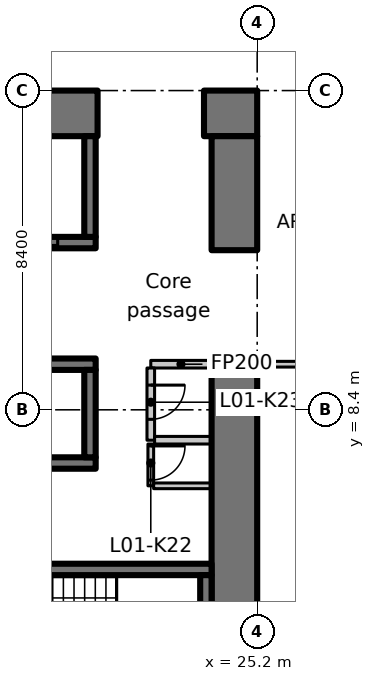
"""IFC4 building model, lengths in metres.
Left out: names, types, materials, properties, quantities, classifications, styles, units other than length and angle.
Written with IfcOpenShell. Run it as: python <this file> out.ifc"""

import sys

from ifc_helpers import new_model, si_unit, direction, frame, frame_2d, origin, place, context, subcontext, project, spatial, rectangle, extrude, element, fill, save


model = new_model("IFC4")
c1 = context("Model", 3, precision=1e-05, world=origin(), true_north=direction((0.0, 1.0)))
c2 = subcontext(c1, "Body", "Model", "MODEL_VIEW")
j1 = project(units=[si_unit("LENGTHUNIT", "METRE"), si_unit("PLANEANGLEUNIT", "RADIAN")], contexts=[c1])
p1 = place(None, origin())
s1 = spatial("IfcSite", under=j1, at=p1, CompositionType="ELEMENT")
p2 = place(p1, origin())
s2 = spatial("IfcBuilding", under=s1, at=p2, CompositionType="ELEMENT")
p3 = place(p2, frame((0.0, 0.0, 7.0)))
s3 = spatial("IfcBuildingStorey", under=s2, at=p3, CompositionType="ELEMENT", Elevation=7.0)
p4 = place(p3, frame((-1.1, 16.2, 0.0), z_axis=(0.0, 0.0, 1.0), x_axis=(1.0, 0.0, 0.0)))
e1 = element("IfcWall", 1, at=p4, inside=s3, PredefinedType="SHEAR", context=c2, shape_type="SweptSolid", body=[
    extrude(rectangle(XDim=22.1, YDim=1.2, at=frame_2d((11.05, 0.0))), origin(), (0.0, 0.0, 1.0), 5.25),
])
p5 = place(p4, frame((3.15, 0.0, 0.0)))
e2 = element("IfcOpeningElement", 2, at=p5, cuts=e1, PredefinedType="OPENING", context=c2, shape_type="SweptSolid", body=[
    extrude(rectangle(XDim=1.1, YDim=2.3, at=frame_2d((0.55, 1.15))), frame((0.0, 0.61, 0.0), z_axis=(0.0, -1.0, 0.0), x_axis=(1.0, 0.0, 0.0)), (0.0, 0.0, 1.0), 1.22),
])
p6 = place(p3, frame((23.8, 16.2, 0.0), z_axis=(0.0, 0.0, 1.0), x_axis=(1.0, 0.0, 0.0)))
e3 = element("IfcWall", 3, at=p6, inside=s3, PredefinedType="SHEAR", context=c2, shape_type="SweptSolid", body=[
    extrude(rectangle(XDim=1.4, YDim=1.2, at=frame_2d((0.7, 0.0))), origin(), (0.0, 0.0, 1.0), 5.25),
])
p7 = place(p3, frame((24.6, 1.2, 0.0), z_axis=(0.0, 0.0, 1.0), x_axis=(0.0, 1.0, 0.0)))
e4 = element("IfcWall", 4, at=p7, inside=s3, PredefinedType="SHEAR", context=c2, shape_type="SweptSolid", body=[
    extrude(rectangle(XDim=8.6, YDim=1.2, at=frame_2d((4.3, 0.0))), origin(), (0.0, 0.0, 1.0), 5.25),
])
p8 = place(p3, frame((24.6, 12.6, 0.0), z_axis=(0.0, 0.0, 1.0), x_axis=(0.0, 1.0, 0.0)))
e5 = element("IfcWall", 5, at=p8, inside=s3, PredefinedType="SHEAR", context=c2, shape_type="SweptSolid", body=[
    extrude(rectangle(XDim=3.0, YDim=1.2, at=frame_2d((1.5, 0.0))), origin(), (0.0, 0.0, 1.0), 5.25),
])
p9 = place(p3, frame((1.2, 7.0, 0.0), z_axis=(0.0, 0.0, 1.0), x_axis=(1.0, 0.0, 0.0)))
e6 = element("IfcWall", 6, at=p9, inside=s3, PredefinedType="SHEAR", context=c2, shape_type="SweptSolid", body=[
    extrude(rectangle(XDim=19.75, YDim=0.3, at=frame_2d((9.875, 0.0))), origin(), (0.0, 0.0, 1.0), 5.25),
])
p10 = place(p3, frame((1.2, 9.6, 0.0), z_axis=(0.0, 0.0, 1.0), x_axis=(1.0, 0.0, 0.0)))
e7 = element("IfcWall", 7, at=p10, inside=s3, PredefinedType="SHEAR", context=c2, shape_type="SweptSolid", body=[
    extrude(rectangle(XDim=19.75, YDim=0.3, at=frame_2d((9.875, 0.0))), origin(), (0.0, 0.0, 1.0), 5.25),
])
p11 = place(p10, frame((0.85, 0.0, 0.0)))
e8 = element("IfcOpeningElement", 8, at=p11, cuts=e7, PredefinedType="OPENING", context=c2, shape_type="SweptSolid", body=[
    extrude(rectangle(XDim=1.1, YDim=2.3, at=frame_2d((0.55, 1.15))), frame((0.0, 0.16, 0.0), z_axis=(0.0, -1.0, 0.0), x_axis=(1.0, 0.0, 0.0)), (0.0, 0.0, 1.0), 0.32),
])
p12 = place(p10, frame((3.65, 0.0, 0.0)))
e9 = element("IfcOpeningElement", 9, at=p12, cuts=e7, PredefinedType="OPENING", context=c2, shape_type="SweptSolid", body=[
    extrude(rectangle(XDim=1.1, YDim=2.3, at=frame_2d((0.55, 1.15))), frame((0.0, 0.16, 0.0), z_axis=(0.0, -1.0, 0.0), x_axis=(1.0, 0.0, 0.0)), (0.0, 0.0, 1.0), 0.32),
])
p13 = place(p10, frame((6.45, 0.0, 0.0)))
e10 = element("IfcOpeningElement", 10, at=p13, cuts=e7, PredefinedType="OPENING", context=c2, shape_type="SweptSolid", body=[
    extrude(rectangle(XDim=1.1, YDim=2.3, at=frame_2d((0.55, 1.15))), frame((0.0, 0.16, 0.0), z_axis=(0.0, -1.0, 0.0), x_axis=(1.0, 0.0, 0.0)), (0.0, 0.0, 1.0), 0.32),
])
p14 = place(p10, frame((9.25, 0.0, 0.0)))
e11 = element("IfcOpeningElement", 11, at=p14, cuts=e7, PredefinedType="OPENING", context=c2, shape_type="SweptSolid", body=[
    extrude(rectangle(XDim=1.1, YDim=2.3, at=frame_2d((0.55, 1.15))), frame((0.0, 0.16, 0.0), z_axis=(0.0, -1.0, 0.0), x_axis=(1.0, 0.0, 0.0)), (0.0, 0.0, 1.0), 0.32),
])
p15 = place(p10, frame((12.05, 0.0, 0.0)))
e12 = element("IfcOpeningElement", 12, at=p15, cuts=e7, PredefinedType="OPENING", context=c2, shape_type="SweptSolid", body=[
    extrude(rectangle(XDim=1.1, YDim=2.3, at=frame_2d((0.55, 1.15))), frame((0.0, 0.16, 0.0), z_axis=(0.0, -1.0, 0.0), x_axis=(1.0, 0.0, 0.0)), (0.0, 0.0, 1.0), 0.32),
])
p16 = place(p10, frame((14.85, 0.0, 0.0)))
e13 = element("IfcOpeningElement", 13, at=p16, cuts=e7, PredefinedType="OPENING", context=c2, shape_type="SweptSolid", body=[
    extrude(rectangle(XDim=1.1, YDim=2.3, at=frame_2d((0.55, 1.15))), frame((0.0, 0.16, 0.0), z_axis=(0.0, -1.0, 0.0), x_axis=(1.0, 0.0, 0.0)), (0.0, 0.0, 1.0), 0.32),
])
p17 = place(p3, frame((20.8, 7.15, 0.0), z_axis=(0.0, 0.0, 1.0), x_axis=(0.0, 1.0, 0.0)))
e14 = element("IfcWall", 14, at=p17, inside=s3, PredefinedType="SHEAR", context=c2, shape_type="SweptSolid", body=[
    extrude(rectangle(XDim=2.3, YDim=0.3, at=frame_2d((1.15, 0.0))), origin(), (0.0, 0.0, 1.0), 5.25),
])
p18 = place(p3, frame((15.05, 12.8, 0.0), z_axis=(0.0, 0.0, 1.0), x_axis=(1.0, 0.0, 0.0)))
e15 = element("IfcWall", 15, at=p18, inside=s3, PredefinedType="SHEAR", context=c2, shape_type="SweptSolid", body=[
    extrude(rectangle(XDim=5.9, YDim=0.3, at=frame_2d((2.95, 0.0))), origin(), (0.0, 0.0, 1.0), 5.25),
])
p19 = place(p18, frame((3.8, 0.0, 0.0)))
e16 = element("IfcOpeningElement", 16, at=p19, cuts=e15, PredefinedType="OPENING", context=c2, shape_type="SweptSolid", body=[
    extrude(rectangle(XDim=1.1, YDim=2.3, at=frame_2d((0.55, 1.15))), frame((0.0, 0.16, 0.0), z_axis=(0.0, -1.0, 0.0), x_axis=(1.0, 0.0, 0.0)), (0.0, 0.0, 1.0), 0.32),
])
p20 = place(p3, frame((20.8, 12.95, 0.0), z_axis=(0.0, 0.0, 1.0), x_axis=(0.0, 1.0, 0.0)))
e17 = element("IfcWall", 17, at=p20, inside=s3, PredefinedType="SHEAR", context=c2, shape_type="SweptSolid", body=[
    extrude(rectangle(XDim=2.65, YDim=0.3, at=frame_2d((1.325, 0.0))), origin(), (0.0, 0.0, 1.0), 5.25),
])
p21 = place(p3, frame((15.8, 4.2, 0.0), z_axis=(0.0, 0.0, 1.0), x_axis=(1.0, 0.0, 0.0)))
e18 = element("IfcWall", 18, at=p21, inside=s3, PredefinedType="SHEAR", context=c2, shape_type="SweptSolid", body=[
    extrude(rectangle(XDim=8.2, YDim=0.3, at=frame_2d((4.1, 0.0))), origin(), (0.0, 0.0, 1.0), 5.25),
])
p22 = place(p21, frame((0.4, 0.0, 0.0)))
e19 = element("IfcOpeningElement", 19, at=p22, cuts=e18, PredefinedType="OPENING", context=c2, shape_type="SweptSolid", body=[
    extrude(rectangle(XDim=1.0, YDim=2.1, at=frame_2d((0.5, 1.05))), frame((0.0, 0.16, 0.0), z_axis=(0.0, -1.0, 0.0), x_axis=(1.0, 0.0, 0.0)), (0.0, 0.0, 1.0), 0.32),
])
p23 = place(p3, frame((23.85, 1.5, 0.0), z_axis=(0.0, 0.0, 1.0), x_axis=(0.0, 1.0, 0.0)))
e20 = element("IfcWall", 20, at=p23, inside=s3, PredefinedType="SHEAR", context=c2, shape_type="SweptSolid", body=[
    extrude(rectangle(XDim=2.55, YDim=0.3, at=frame_2d((1.275, 0.0))), origin(), (0.0, 0.0, 1.0), 5.25),
])
p24 = place(p3, frame((23.988, 9.6, 0.0), z_axis=(0.0, 0.0, 1.0), x_axis=(-1.0, 0.0, 0.0)))
e21 = element("IfcWall", 21, at=p24, inside=s3, PredefinedType="PARTITIONING", context=c2, shape_type="SweptSolid", body=[
    extrude(rectangle(XDim=1.588, YDim=0.2, at=frame_2d((0.794, 0.0))), origin(), (0.0, 0.0, 1.0), 5.25),
])
p25 = place(p3, frame((22.4, 9.5, 0.0), z_axis=(0.0, 0.0, 1.0), x_axis=(0.0, -1.0, 0.0)))
e22 = element("IfcWall", 22, at=p25, inside=s3, PredefinedType="PARTITIONING", context=c2, shape_type="SweptSolid", body=[
    extrude(rectangle(XDim=1.9, YDim=0.2, at=frame_2d((0.95, 0.0))), origin(), (0.0, 0.0, 1.0), 5.25),
])
p26 = place(p25, frame((0.45, 0.0, 0.0)))
e23 = element("IfcOpeningElement", 23, at=p26, cuts=e22, PredefinedType="OPENING", context=c2, shape_type="SweptSolid", body=[
    extrude(rectangle(XDim=0.9, YDim=2.1, at=frame_2d((0.45, 1.05))), frame((0.0, 0.11, 0.0), z_axis=(0.0, -1.0, 0.0), x_axis=(1.0, 0.0, 0.0)), (0.0, 0.0, 1.0), 0.22),
])
p27 = place(p3, frame((22.5, 7.6, 0.0), z_axis=(0.0, 0.0, 1.0), x_axis=(1.0, 0.0, 0.0)))
e24 = element("IfcWall", 24, at=p27, inside=s3, PredefinedType="PARTITIONING", context=c2, shape_type="SweptSolid", body=[
    extrude(rectangle(XDim=1.488, YDim=0.2, at=frame_2d((0.744, 0.0))), origin(), (0.0, 0.0, 1.0), 5.25),
])
p28 = place(p3, frame((22.4, 7.5, 0.0), z_axis=(0.0, 0.0, 1.0), x_axis=(0.0, -1.0, 0.0)))
e25 = element("IfcWall", 25, at=p28, inside=s3, PredefinedType="PARTITIONING", context=c2, shape_type="SweptSolid", body=[
    extrude(rectangle(XDim=1.1, YDim=0.15, at=frame_2d((0.55, 0.0))), origin(), (0.0, 0.0, 1.0), 5.25),
])
p29 = place(p28, frame((0.05, 0.0, 0.0)))
e26 = element("IfcOpeningElement", 26, at=p29, cuts=e25, PredefinedType="OPENING", context=c2, shape_type="SweptSolid", body=[
    extrude(rectangle(XDim=0.9, YDim=2.1, at=frame_2d((0.45, 1.05))), frame((0.0, 0.085, 0.0), z_axis=(0.0, -1.0, 0.0), x_axis=(1.0, 0.0, 0.0)), (0.0, 0.0, 1.0), 0.17),
])
p30 = place(p3, frame((22.475, 6.4, 0.0), z_axis=(0.0, 0.0, 1.0), x_axis=(1.0, 0.0, 0.0)))
e27 = element("IfcWall", 27, at=p30, inside=s3, PredefinedType="PARTITIONING", context=c2, shape_type="SweptSolid", body=[
    extrude(rectangle(XDim=1.513, YDim=0.15, at=frame_2d((0.756, 0.0))), origin(), (0.0, 0.0, 1.0), 5.25),
])
p31 = place(p3, frame((29.4, 9.6, 0.0), z_axis=(0.0, 0.0, 1.0), x_axis=(-1.0, 0.0, 0.0)))
e28 = element("IfcWall", 28, at=p31, inside=s3, PredefinedType="PARTITIONING", context=c2, shape_type="SweptSolid", body=[
    extrude(rectangle(XDim=4.2, YDim=0.15, at=frame_2d((2.1, 0.0))), origin(), (0.0, 0.0, 1.0), 5.23),
])
p32 = place(p19, origin())
e29 = element("IfcDoor", 29, at=p32, inside=s3, OperationType="SLIDING_TO_LEFT", PredefinedType="DOOR", context=c2, shape_type="SweptSolid", body=[
    extrude(rectangle(XDim=1.1, YDim=2.3, at=frame_2d((0.55, 1.15))), frame((0.0, 0.025, 0.0), z_axis=(0.0, -1.0, 0.0), x_axis=(1.0, 0.0, 0.0)), (0.0, 0.0, 1.0), 0.05),
])
fill(e16, e29)
p33 = place(p29, origin())
e30 = element("IfcDoor", 30, at=p33, inside=s3, OperationType="SINGLE_SWING_RIGHT", PredefinedType="DOOR", context=c2, shape_type="SweptSolid", body=[
    extrude(rectangle(XDim=0.9, YDim=2.1, at=frame_2d((0.45, 1.05))), frame((0.0, 0.025, 0.0), z_axis=(0.0, -1.0, 0.0), x_axis=(1.0, 0.0, 0.0)), (0.0, 0.0, 1.0), 0.05),
])
fill(e26, e30)
p34 = place(p26, origin())
e31 = element("IfcDoor", 31, at=p34, inside=s3, OperationType="SINGLE_SWING_LEFT", PredefinedType="DOOR", context=c2, shape_type="SweptSolid", body=[
    extrude(rectangle(XDim=0.9, YDim=2.1, at=frame_2d((0.45, 1.05))), frame((0.0, 0.025, 0.0), z_axis=(0.0, -1.0, 0.0), x_axis=(1.0, 0.0, 0.0)), (0.0, 0.0, 1.0), 0.05),
])
fill(e23, e31)
save(model, sys.argv[1])
